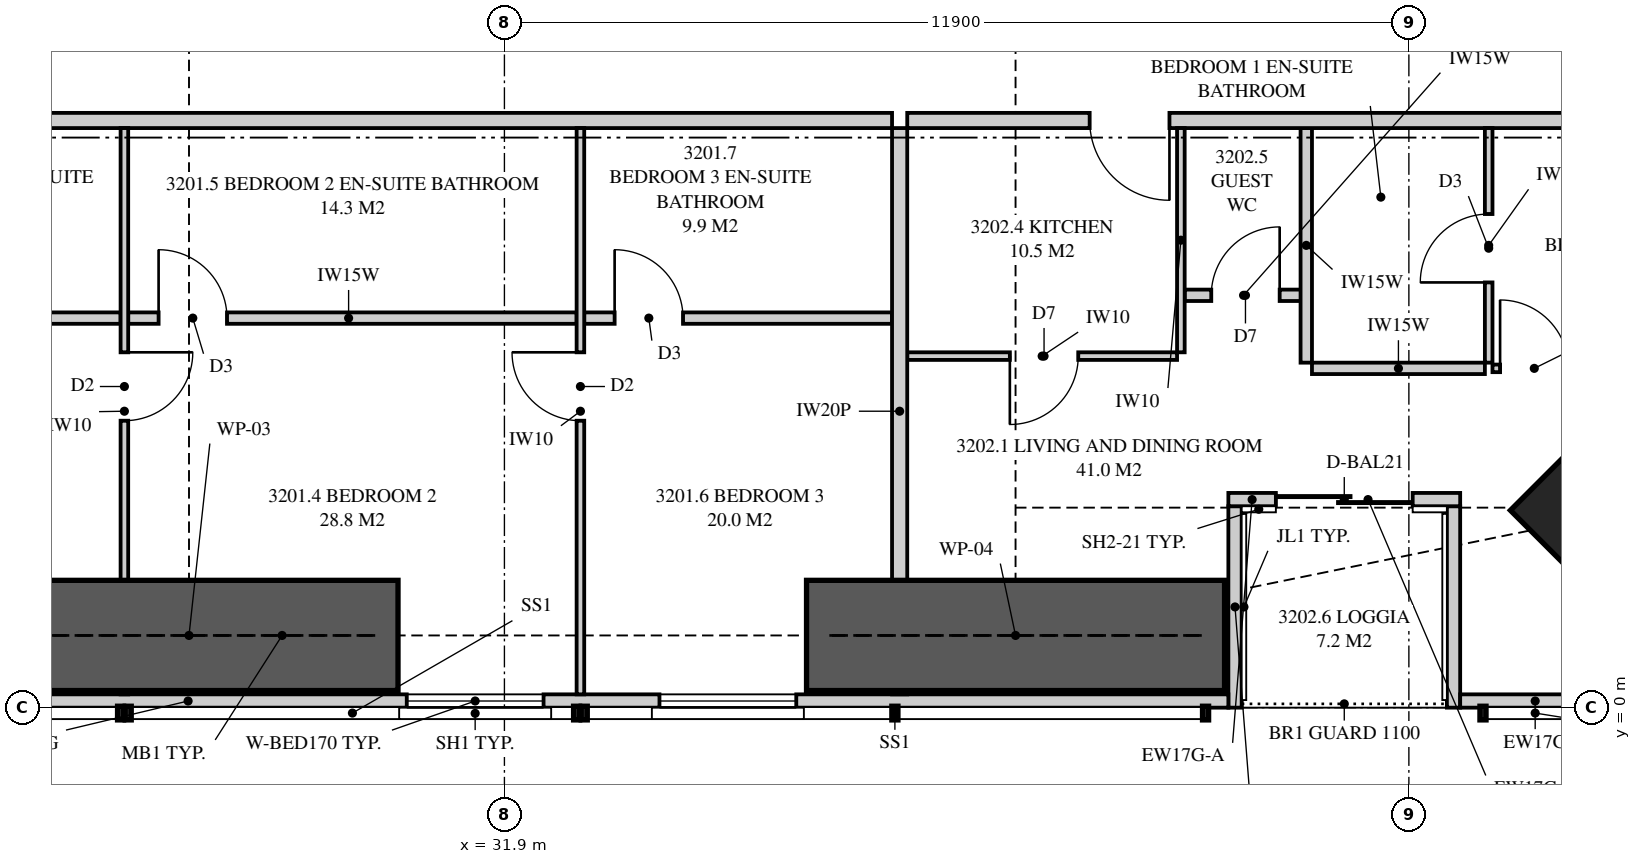
"""IFC4 building model, lengths in metres.
Left out: names, types, materials, properties, quantities, classifications, styles, units other than length and angle.
Written with IfcOpenShell. Run it as: python <this file> out.ifc"""

import sys

from ifc_helpers import new_model, si_unit, direction, frame, frame_2d, origin, origin_2d, place, context, subcontext, project, spatial, polyline, rectangle, outline, extrude, element, fill, save


model = new_model("IFC4")
c1 = context("Model", 3, precision=1e-05, world=origin(), true_north=direction((0.0, 1.0)))
c2 = subcontext(c1, "Body", "Model", "MODEL_VIEW")
j1 = project(units=[si_unit("LENGTHUNIT", "METRE"), si_unit("PLANEANGLEUNIT", "RADIAN")], contexts=[c1])
p1 = place(None, origin())
s1 = spatial("IfcSite", under=j1, at=p1, CompositionType="ELEMENT")
p2 = place(p1, origin())
s2 = spatial("IfcBuilding", under=s1, at=p2, CompositionType="ELEMENT")
p3 = place(p2, frame((0.0, 0.0, 118.25)))
s3 = spatial("IfcBuildingStorey", under=s2, at=p3, CompositionType="ELEMENT", Elevation=118.25)
p4 = place(p3, frame((46.869, 2.631, 0.0), z_axis=(0.0, 0.0, 1.0), x_axis=(-0.707106781187, 0.707106781187, 0.0)))
e1 = element("IfcColumn", 1, at=p4, inside=s3, PredefinedType="COLUMN", context=c2, shape_type="SweptSolid", body=[
    extrude(rectangle(XDim=2.4, YDim=2.5, at=origin_2d()), origin(), (0.0, 0.0, 1.0), 3.35),
])
p5 = place(p3, frame((14.051, 0.087, 0.0), z_axis=(0.0, 0.0, 1.0), x_axis=(1.0, 0.0, 0.0)))
e2 = element("IfcWall", 2, at=p5, inside=s3, PredefinedType="SOLIDWALL", context=c2, shape_type="SweptSolid", body=[
    extrude(outline(polyline([(0.0, 0.0), (27.374, 0.0), (27.374, 3.11), (24.777, 3.11), (24.777, 2.15), (24.732, 2.15), (24.732, 3.11), (24.574, 3.11), (24.574, 2.15), (2.824, 2.15), (2.824, 3.11), (2.666, 3.11), (2.666, 2.15), (2.62, 2.15), (2.62, 3.11), (0.0, 3.11), (0.0, 0.0)])), frame((0.0, 0.087, 0.0), z_axis=(0.0, -1.0, 0.0), x_axis=(1.0, 0.0, 0.0)), (0.0, 0.0, 1.0), 0.175),
])
p6 = place(p5, frame((5.874, 0.0, 0.4)))
e3 = element("IfcOpeningElement", 3, at=p6, cuts=e2, PredefinedType="OPENING", context=c2, shape_type="SweptSolid", body=[
    extrude(rectangle(XDim=1.8, YDim=1.7, at=frame_2d((0.9, 0.85))), frame((0.0, 0.097, 0.0), z_axis=(0.0, -1.0, 0.0), x_axis=(1.0, 0.0, 0.0)), (0.0, 0.0, 1.0), 0.195),
])
p7 = place(p5, frame((9.04, 0.0, 0.4)))
e4 = element("IfcOpeningElement", 4, at=p7, cuts=e2, PredefinedType="OPENING", context=c2, shape_type="SweptSolid", body=[
    extrude(rectangle(XDim=1.8, YDim=1.7, at=frame_2d((0.9, 0.85))), frame((0.0, 0.097, 0.0), z_axis=(0.0, -1.0, 0.0), x_axis=(1.0, 0.0, 0.0)), (0.0, 0.0, 1.0), 0.195),
])
p8 = place(p5, frame((16.564, 0.0, 0.4)))
e5 = element("IfcOpeningElement", 5, at=p8, cuts=e2, PredefinedType="OPENING", context=c2, shape_type="SweptSolid", body=[
    extrude(rectangle(XDim=1.8, YDim=1.7, at=frame_2d((0.9, 0.85))), frame((0.0, 0.097, 0.0), z_axis=(0.0, -1.0, 0.0), x_axis=(1.0, 0.0, 0.0)), (0.0, 0.0, 1.0), 0.195),
])
p9 = place(p5, frame((19.889, 0.0, 0.4)))
e6 = element("IfcOpeningElement", 6, at=p9, cuts=e2, PredefinedType="OPENING", context=c2, shape_type="SweptSolid", body=[
    extrude(rectangle(XDim=1.8, YDim=1.7, at=frame_2d((0.9, 0.85))), frame((0.0, 0.097, 0.0), z_axis=(0.0, -1.0, 0.0), x_axis=(1.0, 0.0, 0.0)), (0.0, 0.0, 1.0), 0.195),
])
p10 = place(p3, frame((44.475, 0.087, 0.0), z_axis=(0.0, 0.0, 1.0), x_axis=(1.0, 0.0, 0.0)))
e7 = element("IfcWall", 7, at=p10, inside=s3, PredefinedType="SOLIDWALL", context=c2, shape_type="SweptSolid", body=[
    extrude(rectangle(XDim=1.974, YDim=0.175, at=frame_2d((0.987, 0.0))), origin(), (0.0, 0.0, 1.0), 3.11),
])
p11 = place(p3, frame((41.425, 2.738, 0.0), z_axis=(0.0, 0.0, 1.0), x_axis=(1.0, 0.0, 0.0)))
e8 = element("IfcWall", 8, at=p11, inside=s3, PredefinedType="SOLIDWALL", context=c2, shape_type="SweptSolid", body=[
    extrude(rectangle(XDim=0.625, YDim=0.175, at=frame_2d((0.312, 0.0))), origin(), (0.0, 0.0, 1.0), 2.51),
])
p12 = place(p3, frame((42.05, 2.738, 0.0), z_axis=(0.0, 0.0, 1.0), x_axis=(1.0, 0.0, 0.0)))
e9 = element("IfcWall", 9, at=p12, inside=s3, PredefinedType="SOLIDWALL", context=c2, shape_type="SweptSolid", body=[
    extrude(rectangle(XDim=2.425, YDim=0.175, at=frame_2d((1.212, 0.0))), origin(), (0.0, 0.0, 1.0), 2.15),
])
p13 = place(p12, origin())
e10 = element("IfcOpeningElement", 10, at=p13, cuts=e9, PredefinedType="OPENING", context=c2, shape_type="SweptSolid", body=[
    extrude(rectangle(XDim=1.8, YDim=2.1, at=frame_2d((0.9, 1.05))), frame((0.0, 0.097, 0.0), z_axis=(0.0, -1.0, 0.0), x_axis=(1.0, 0.0, 0.0)), (0.0, 0.0, 1.0), 0.195),
])
p14 = place(p3, frame((41.512, 0.0, 0.0), z_axis=(0.0, 0.0, 1.0), x_axis=(0.0, 1.0, 0.0)))
e11 = element("IfcWall", 11, at=p14, inside=s3, PredefinedType="SOLIDWALL", context=c2, shape_type="SweptSolid", body=[
    extrude(outline(polyline([(0.0, 0.0), (2.65, 0.0), (2.65, 2.51), (2.373, 2.51), (2.373, 2.15), (0.705, 2.15), (0.705, 3.11), (0.0, 3.11), (0.0, 0.0)])), frame((0.0, 0.087, 0.0), z_axis=(0.0, -1.0, 0.0), x_axis=(1.0, 0.0, 0.0)), (0.0, 0.0, 1.0), 0.175),
])
p15 = place(p3, frame((44.387, 0.0, 0.0), z_axis=(0.0, 0.0, 1.0), x_axis=(0.0, 1.0, 0.0)))
e12 = element("IfcWall", 12, at=p15, inside=s3, PredefinedType="SOLIDWALL", context=c2, shape_type="SweptSolid", body=[
    extrude(outline(polyline([(0.0, 0.0), (2.65, 0.0), (2.65, 2.15), (1.291, 2.15), (1.291, 3.11), (0.0, 3.11), (0.0, 0.0)])), frame((0.0, 0.087, 0.0), z_axis=(0.0, -1.0, 0.0), x_axis=(1.0, 0.0, 0.0)), (0.0, 0.0, 1.0), 0.175),
])
p16 = place(p3, frame((37.1, 0.175, 0.0), z_axis=(0.0, 0.0, 1.0), x_axis=(0.0, 1.0, 0.0)))
e13 = element("IfcWall", 13, at=p16, inside=s3, PredefinedType="PARTITIONING", context=c2, shape_type="SweptSolid", body=[
    extrude(outline(polyline([(0.529, 2.15), (0.0, 2.15), (0.0, 0.0), (0.529, 0.0), (0.529, 0.461), (1.021, 0.461), (1.021, 0.0), (7.45, 0.0), (7.45, 3.11), (1.685, 3.11), (1.685, 2.15), (1.021, 2.15), (1.021, 1.688), (0.529, 1.688), (0.529, 2.15)])), frame((0.0, 0.1, 0.0), z_axis=(0.0, -1.0, 0.0), x_axis=(1.0, 0.0, 0.0)), (0.0, 0.0, 1.0), 0.2),
])
p17 = place(p3, frame((17.775, 7.725, 0.0), z_axis=(0.0, 0.0, 1.0), x_axis=(1.0, 0.0, 0.0)))
e14 = element("IfcWall", 14, at=p17, inside=s3, PredefinedType="PARTITIONING", context=c2, shape_type="SweptSolid", body=[
    extrude(outline(polyline([(0.0, 0.0), (19.225, 0.0), (19.225, 3.11), (10.312, 3.11), (10.312, 2.541), (9.638, 2.541), (9.638, 3.11), (0.0, 3.11), (0.0, 0.0)])), frame((0.0, 0.1, 0.0), z_axis=(0.0, -1.0, 0.0), x_axis=(1.0, 0.0, 0.0)), (0.0, 0.0, 1.0), 0.2),
])
p18 = place(p17, frame((3.275, 0.0, 0.0)))
e15 = element("IfcOpeningElement", 15, at=p18, cuts=e14, PredefinedType="OPENING", context=c2, shape_type="SweptSolid", body=[
    extrude(rectangle(XDim=1.05, YDim=2.2, at=frame_2d((0.525, 1.1))), frame((0.0, 0.11, 0.0), z_axis=(0.0, -1.0, 0.0), x_axis=(1.0, 0.0, 0.0)), (0.0, 0.0, 1.0), 0.22),
])
p19 = place(p3, frame((26.9, 0.175, 0.0), z_axis=(0.0, 0.0, 1.0), x_axis=(0.0, 1.0, 0.0)))
e16 = element("IfcWall", 16, at=p19, inside=s3, PredefinedType="PARTITIONING", context=c2, shape_type="SweptSolid", body=[
    extrude(outline(polyline([(0.529, 2.15), (0.0, 2.15), (0.0, 0.0), (0.529, 0.0), (0.529, 0.889), (1.021, 0.889), (1.021, 0.0), (7.45, 0.0), (7.45, 3.11), (1.635, 3.11), (1.635, 2.15), (1.021, 2.15), (1.021, 1.261), (0.529, 1.261), (0.529, 2.15)])), frame((0.0, 0.05, 0.0), z_axis=(0.0, -1.0, 0.0), x_axis=(1.0, 0.0, 0.0)), (0.0, 0.0, 1.0), 0.1),
])
p20 = place(p19, frame((3.6, 0.0, 0.0)))
e17 = element("IfcOpeningElement", 17, at=p20, cuts=e16, PredefinedType="OPENING", context=c2, shape_type="SweptSolid", body=[
    extrude(rectangle(XDim=0.9, YDim=2.1, at=frame_2d((0.45, 1.05))), frame((0.0, 0.06, 0.0), z_axis=(0.0, -1.0, 0.0), x_axis=(1.0, 0.0, 0.0)), (0.0, 0.0, 1.0), 0.12),
])
p21 = place(p3, frame((32.9, 0.175, 0.0), z_axis=(0.0, 0.0, 1.0), x_axis=(0.0, 1.0, 0.0)))
e18 = element("IfcWall", 18, at=p21, inside=s3, PredefinedType="PARTITIONING", context=c2, shape_type="SweptSolid", body=[
    extrude(outline(polyline([(0.0, 0.0), (7.45, 0.0), (7.45, 3.11), (1.635, 3.11), (1.635, 2.15), (0.0, 2.15), (0.0, 3.11), (0.0, 0.0)])), frame((0.0, 0.05, 0.0), z_axis=(0.0, -1.0, 0.0), x_axis=(1.0, 0.0, 0.0)), (0.0, 0.0, 1.0), 0.1),
])
p22 = place(p21, frame((3.6, 0.0, 0.0)))
e19 = element("IfcOpeningElement", 19, at=p22, cuts=e18, PredefinedType="OPENING", context=c2, shape_type="SweptSolid", body=[
    extrude(rectangle(XDim=0.9, YDim=2.1, at=frame_2d((0.45, 1.05))), frame((0.0, 0.06, 0.0), z_axis=(0.0, -1.0, 0.0), x_axis=(1.0, 0.0, 0.0)), (0.0, 0.0, 1.0), 0.12),
])
p23 = place(p3, frame((22.7, 5.125, 0.0), z_axis=(0.0, 0.0, 1.0), x_axis=(1.0, 0.0, 0.0)))
e20 = element("IfcWall", 20, at=p23, inside=s3, PredefinedType="PLUMBINGWALL", context=c2, shape_type="SweptSolid", body=[
    extrude(rectangle(XDim=4.15, YDim=0.15, at=frame_2d((2.075, 0.0))), origin(), (0.0, 0.0, 1.0), 3.11),
])
p24 = place(p23, frame((0.4, 0.0, 0.0)))
e21 = element("IfcOpeningElement", 21, at=p24, cuts=e20, PredefinedType="OPENING", context=c2, shape_type="SweptSolid", body=[
    extrude(rectangle(XDim=0.9, YDim=2.1, at=frame_2d((0.45, 1.05))), frame((0.0, 0.085, 0.0), z_axis=(0.0, -1.0, 0.0), x_axis=(1.0, 0.0, 0.0)), (0.0, 0.0, 1.0), 0.17),
])
p25 = place(p3, frame((26.95, 5.125, 0.0), z_axis=(0.0, 0.0, 1.0), x_axis=(1.0, 0.0, 0.0)))
e22 = element("IfcWall", 22, at=p25, inside=s3, PredefinedType="PLUMBINGWALL", context=c2, shape_type="SweptSolid", body=[
    extrude(outline(polyline([(0.0, 0.0), (5.9, 0.0), (5.9, 3.11), (1.112, 3.11), (1.112, 2.541), (0.488, 2.541), (0.488, 3.11), (0.0, 3.11), (0.0, 0.0)])), frame((0.0, 0.075, 0.0), z_axis=(0.0, -1.0, 0.0), x_axis=(1.0, 0.0, 0.0)), (0.0, 0.0, 1.0), 0.15),
])
p26 = place(p25, frame((0.4, 0.0, 0.0)))
e23 = element("IfcOpeningElement", 23, at=p26, cuts=e22, PredefinedType="OPENING", context=c2, shape_type="SweptSolid", body=[
    extrude(rectangle(XDim=0.9, YDim=2.1, at=frame_2d((0.45, 1.05))), frame((0.0, 0.085, 0.0), z_axis=(0.0, -1.0, 0.0), x_axis=(1.0, 0.0, 0.0)), (0.0, 0.0, 1.0), 0.17),
])
p27 = place(p3, frame((32.95, 5.125, 0.0), z_axis=(0.0, 0.0, 1.0), x_axis=(1.0, 0.0, 0.0)))
e24 = element("IfcWall", 24, at=p27, inside=s3, PredefinedType="PLUMBINGWALL", context=c2, shape_type="SweptSolid", body=[
    extrude(rectangle(XDim=4.05, YDim=0.15, at=frame_2d((2.025, 0.0))), origin(), (0.0, 0.0, 1.0), 3.11),
])
p28 = place(p27, frame((0.4, 0.0, 0.0)))
e25 = element("IfcOpeningElement", 25, at=p28, cuts=e24, PredefinedType="OPENING", context=c2, shape_type="SweptSolid", body=[
    extrude(rectangle(XDim=0.9, YDim=2.1, at=frame_2d((0.45, 1.05))), frame((0.0, 0.085, 0.0), z_axis=(0.0, -1.0, 0.0), x_axis=(1.0, 0.0, 0.0)), (0.0, 0.0, 1.0), 0.17),
])
p29 = place(p3, frame((37.2, 7.725, 0.0), z_axis=(0.0, 0.0, 1.0), x_axis=(1.0, 0.0, 0.0)))
e26 = element("IfcWall", 26, at=p29, inside=s3, PredefinedType="PARTITIONING", context=c2, shape_type="SweptSolid", body=[
    extrude(outline(polyline([(0.0, 0.0), (8.825, 0.0), (8.825, 3.11), (1.762, 3.11), (1.762, 2.541), (1.088, 2.541), (1.088, 3.11), (0.0, 3.11), (0.0, 0.0)])), frame((0.0, 0.1, 0.0), z_axis=(0.0, -1.0, 0.0), x_axis=(1.0, 0.0, 0.0)), (0.0, 0.0, 1.0), 0.2),
])
p30 = place(p29, frame((2.4, 0.0, 0.0)))
e27 = element("IfcOpeningElement", 27, at=p30, cuts=e26, PredefinedType="OPENING", context=c2, shape_type="SweptSolid", body=[
    extrude(rectangle(XDim=1.05, YDim=2.2, at=frame_2d((0.525, 1.1))), frame((0.0, 0.11, 0.0), z_axis=(0.0, -1.0, 0.0), x_axis=(1.0, 0.0, 0.0)), (0.0, 0.0, 1.0), 0.22),
])
p31 = place(p3, frame((44.85, 4.539, 0.0), z_axis=(0.0, 0.0, 1.0), x_axis=(0.0, 1.0, 0.0)))
e28 = element("IfcWall", 28, at=p31, inside=s3, PredefinedType="PARTITIONING", context=c2, shape_type="SweptSolid", body=[
    extrude(rectangle(XDim=3.086, YDim=0.1, at=frame_2d((1.543, 0.0))), origin(), (0.0, 0.0, 1.0), 3.11),
])
p32 = place(p31, frame((1.056, 0.0, 0.0)))
e29 = element("IfcOpeningElement", 29, at=p32, cuts=e28, PredefinedType="OPENING", context=c2, shape_type="SweptSolid", body=[
    extrude(rectangle(XDim=0.9, YDim=2.1, at=frame_2d((0.45, 1.05))), frame((0.0, 0.06, 0.0), z_axis=(0.0, -1.0, 0.0), x_axis=(1.0, 0.0, 0.0)), (0.0, 0.0, 1.0), 0.12),
])
p33 = place(p3, frame((44.9, 4.464, 0.0), z_axis=(0.0, 0.0, 1.0), x_axis=(1.0, 0.0, 0.0)))
e30 = element("IfcWall", 30, at=p33, inside=s3, PredefinedType="PARTITIONING", context=c2, shape_type="SweptSolid", body=[
    extrude(outline(polyline([(0.0, 0.0), (4.6, 0.0), (4.6, 3.11), (3.137, 3.11), (3.137, 2.15), (1.395, 2.15), (1.395, 3.11), (0.0, 3.11), (0.0, 0.0)])), frame((0.0, 0.05, 0.0), z_axis=(0.0, -1.0, 0.0), x_axis=(1.0, 0.0, 0.0)), (0.0, 0.0, 1.0), 0.1),
])
p34 = place(p33, frame((0.1, 0.0, 0.0)))
e31 = element("IfcOpeningElement", 31, at=p34, cuts=e30, PredefinedType="OPENING", context=c2, shape_type="SweptSolid", body=[
    extrude(rectangle(XDim=0.9, YDim=2.1, at=frame_2d((0.45, 1.05))), frame((0.0, 0.06, 0.0), z_axis=(0.0, -1.0, 0.0), x_axis=(1.0, 0.0, 0.0)), (0.0, 0.0, 1.0), 0.12),
])
p35 = place(p3, frame((42.525, 4.464, 0.0), z_axis=(0.0, 0.0, 1.0), x_axis=(1.0, 0.0, 0.0)))
e32 = element("IfcWall", 32, at=p35, inside=s3, PredefinedType="PLUMBINGWALL", context=c2, shape_type="SweptSolid", body=[
    extrude(rectangle(XDim=2.275, YDim=0.15, at=frame_2d((1.138, 0.0))), origin(), (0.0, 0.0, 1.0), 3.11),
])
p36 = place(p3, frame((42.45, 4.539, 0.0), z_axis=(0.0, 0.0, 1.0), x_axis=(0.0, 1.0, 0.0)))
e33 = element("IfcWall", 33, at=p36, inside=s3, PredefinedType="PLUMBINGWALL", context=c2, shape_type="SweptSolid", body=[
    extrude(rectangle(XDim=3.086, YDim=0.15, at=frame_2d((1.543, 0.0))), origin(), (0.0, 0.0, 1.0), 3.11),
])
p37 = place(p3, frame((37.2, 4.625, 0.0), z_axis=(0.0, 0.0, 1.0), x_axis=(1.0, 0.0, 0.0)))
e34 = element("IfcWall", 34, at=p37, inside=s3, PredefinedType="PARTITIONING", context=c2, shape_type="SweptSolid", body=[
    extrude(outline(polyline([(0.0, 0.0), (3.55, 0.0), (3.55, 3.11), (1.712, 3.11), (1.712, 2.541), (1.138, 2.541), (1.138, 3.11), (0.0, 3.11), (0.0, 0.0)])), frame((0.0, 0.05, 0.0), z_axis=(0.0, -1.0, 0.0), x_axis=(1.0, 0.0, 0.0)), (0.0, 0.0, 1.0), 0.1),
])
p38 = place(p37, frame((1.35, 0.0, 0.0)))
e35 = element("IfcOpeningElement", 35, at=p38, cuts=e34, PredefinedType="OPENING", context=c2, shape_type="SweptSolid", body=[
    extrude(rectangle(XDim=0.9, YDim=2.1, at=frame_2d((0.45, 1.05))), frame((0.0, 0.06, 0.0), z_axis=(0.0, -1.0, 0.0), x_axis=(1.0, 0.0, 0.0)), (0.0, 0.0, 1.0), 0.12),
])
p39 = place(p3, frame((40.8, 4.675, 0.0), z_axis=(0.0, 0.0, 1.0), x_axis=(0.0, 1.0, 0.0)))
e36 = element("IfcWall", 36, at=p39, inside=s3, PredefinedType="PARTITIONING", context=c2, shape_type="SweptSolid", body=[
    extrude(rectangle(XDim=2.95, YDim=0.1, at=frame_2d((1.475, 0.0))), origin(), (0.0, 0.0, 1.0), 3.11),
])
p40 = place(p3, frame((40.85, 5.425, 0.0), z_axis=(0.0, 0.0, 1.0), x_axis=(1.0, 0.0, 0.0)))
e37 = element("IfcWall", 37, at=p40, inside=s3, PredefinedType="PLUMBINGWALL", context=c2, shape_type="SweptSolid", body=[
    extrude(rectangle(XDim=1.55, YDim=0.15, at=frame_2d((0.775, 0.0))), origin(), (0.0, 0.0, 1.0), 3.11),
])
p41 = place(p40, frame((0.35, 0.0, 0.0)))
e38 = element("IfcOpeningElement", 38, at=p41, cuts=e37, PredefinedType="OPENING", context=c2, shape_type="SweptSolid", body=[
    extrude(rectangle(XDim=0.9, YDim=2.1, at=frame_2d((0.45, 1.05))), frame((0.0, 0.085, 0.0), z_axis=(0.0, -1.0, 0.0), x_axis=(1.0, 0.0, 0.0)), (0.0, 0.0, 1.0), 0.17),
])
for number, where, z_axis, x_axis in (
    (39, (25.0, 0.95, 0.0), (0.0, 0.0, 1.0), (1.0, 0.0, 0.0)),
    (40, (35.875, 0.95, 0.0), (0.0, 0.0, 1.0), (1.0, 0.0, 0.0)),
):
    element("IfcWall", number, at=place(p3, frame(where, z_axis=z_axis, x_axis=x_axis)), inside=s3, PredefinedType="SHEAR", context=c2, shape_type="SweptSolid", body=[
        extrude(rectangle(XDim=5.5, YDim=1.45, at=frame_2d((2.75, 0.0))), origin(), (0.0, 0.0, 1.0), 3.35),
    ])
p42 = place(p8, origin())
e41 = element("IfcWindow", 41, at=p42, inside=s3, PartitioningType="SINGLE_PANEL", PredefinedType="WINDOW", context=c2, shape_type="SweptSolid", body=[
    extrude(rectangle(XDim=1.8, YDim=1.7, at=frame_2d((0.9, 0.85))), frame((0.0, 0.03, 0.0), z_axis=(0.0, -1.0, 0.0), x_axis=(1.0, 0.0, 0.0)), (0.0, 0.0, 1.0), 0.06),
])
fill(e5, e41)
p43 = place(p9, origin())
e42 = element("IfcWindow", 42, at=p43, inside=s3, PartitioningType="SINGLE_PANEL", PredefinedType="WINDOW", context=c2, shape_type="SweptSolid", body=[
    extrude(rectangle(XDim=1.8, YDim=1.7, at=frame_2d((0.9, 0.85))), frame((0.0, 0.03, 0.0), z_axis=(0.0, -1.0, 0.0), x_axis=(1.0, 0.0, 0.0)), (0.0, 0.0, 1.0), 0.06),
])
fill(e6, e42)
p44 = place(p13, origin())
e43 = element("IfcDoor", 43, at=p44, inside=s3, OperationType="SLIDING_TO_LEFT", PredefinedType="DOOR", context=c2, shape_type="SweptSolid", body=[
    extrude(rectangle(XDim=1.8, YDim=2.1, at=frame_2d((0.9, 1.05))), frame((0.0, 0.025, 0.0), z_axis=(0.0, -1.0, 0.0), x_axis=(1.0, 0.0, 0.0)), (0.0, 0.0, 1.0), 0.05),
])
fill(e10, e43)
p45 = place(p20, frame((0.9, 0.0, 0.0), z_axis=(0.0, 0.0, 1.0), x_axis=(-1.0, 0.0, 0.0)))
e44 = element("IfcDoor", 44, at=p45, inside=s3, OperationType="SINGLE_SWING_LEFT", PredefinedType="DOOR", context=c2, shape_type="SweptSolid", body=[
    extrude(rectangle(XDim=0.9, YDim=2.1, at=frame_2d((0.45, 1.05))), frame((0.0, 0.025, 0.0), z_axis=(0.0, -1.0, 0.0), x_axis=(1.0, 0.0, 0.0)), (0.0, 0.0, 1.0), 0.05),
])
fill(e17, e44)
p46 = place(p26, origin())
e45 = element("IfcDoor", 45, at=p46, inside=s3, OperationType="SINGLE_SWING_LEFT", PredefinedType="DOOR", context=c2, shape_type="SweptSolid", body=[
    extrude(rectangle(XDim=0.9, YDim=2.1, at=frame_2d((0.45, 1.05))), frame((0.0, 0.025, 0.0), z_axis=(0.0, -1.0, 0.0), x_axis=(1.0, 0.0, 0.0)), (0.0, 0.0, 1.0), 0.05),
])
fill(e23, e45)
p47 = place(p22, origin())
e46 = element("IfcDoor", 46, at=p47, inside=s3, OperationType="SINGLE_SWING_RIGHT", PredefinedType="DOOR", context=c2, shape_type="SweptSolid", body=[
    extrude(rectangle(XDim=0.9, YDim=2.1, at=frame_2d((0.45, 1.05))), frame((0.0, 0.025, 0.0), z_axis=(0.0, -1.0, 0.0), x_axis=(1.0, 0.0, 0.0)), (0.0, 0.0, 1.0), 0.05),
])
fill(e19, e46)
p48 = place(p28, origin())
e47 = element("IfcDoor", 47, at=p48, inside=s3, OperationType="SINGLE_SWING_LEFT", PredefinedType="DOOR", context=c2, shape_type="SweptSolid", body=[
    extrude(rectangle(XDim=0.9, YDim=2.1, at=frame_2d((0.45, 1.05))), frame((0.0, 0.025, 0.0), z_axis=(0.0, -1.0, 0.0), x_axis=(1.0, 0.0, 0.0)), (0.0, 0.0, 1.0), 0.05),
])
fill(e25, e47)
p49 = place(p30, frame((1.05, 0.0, 0.0), z_axis=(0.0, 0.0, 1.0), x_axis=(-1.0, 0.0, 0.0)))
e48 = element("IfcDoor", 48, at=p49, inside=s3, OperationType="SINGLE_SWING_LEFT", PredefinedType="DOOR", context=c2, shape_type="SweptSolid", body=[
    extrude(rectangle(XDim=1.05, YDim=2.2, at=frame_2d((0.525, 1.1))), frame((0.0, 0.025, 0.0), z_axis=(0.0, -1.0, 0.0), x_axis=(1.0, 0.0, 0.0)), (0.0, 0.0, 1.0), 0.05),
])
fill(e27, e48)
p50 = place(p34, origin())
e49 = element("IfcDoor", 49, at=p50, inside=s3, OperationType="SINGLE_SWING_LEFT", PredefinedType="DOOR", context=c2, shape_type="SweptSolid", body=[
    extrude(rectangle(XDim=0.9, YDim=2.1, at=frame_2d((0.45, 1.05))), frame((0.0, 0.025, 0.0), z_axis=(0.0, -1.0, 0.0), x_axis=(1.0, 0.0, 0.0)), (0.0, 0.0, 1.0), 0.05),
])
fill(e31, e49)
p51 = place(p32, origin())
e50 = element("IfcDoor", 50, at=p51, inside=s3, OperationType="SINGLE_SWING_LEFT", PredefinedType="DOOR", context=c2, shape_type="SweptSolid", body=[
    extrude(rectangle(XDim=0.9, YDim=2.1, at=frame_2d((0.45, 1.05))), frame((0.0, 0.025, 0.0), z_axis=(0.0, -1.0, 0.0), x_axis=(1.0, 0.0, 0.0)), (0.0, 0.0, 1.0), 0.05),
])
fill(e29, e50)
p52 = place(p38, frame((0.9, 0.0, 0.0), z_axis=(0.0, 0.0, 1.0), x_axis=(-1.0, 0.0, 0.0)))
e51 = element("IfcDoor", 51, at=p52, inside=s3, OperationType="SINGLE_SWING_RIGHT", PredefinedType="DOOR", context=c2, shape_type="SweptSolid", body=[
    extrude(rectangle(XDim=0.9, YDim=2.1, at=frame_2d((0.45, 1.05))), frame((0.0, 0.025, 0.0), z_axis=(0.0, -1.0, 0.0), x_axis=(1.0, 0.0, 0.0)), (0.0, 0.0, 1.0), 0.05),
])
fill(e35, e51)
p53 = place(p41, origin())
e52 = element("IfcDoor", 52, at=p53, inside=s3, OperationType="SINGLE_SWING_RIGHT", PredefinedType="DOOR", context=c2, shape_type="SweptSolid", body=[
    extrude(rectangle(XDim=0.9, YDim=2.1, at=frame_2d((0.45, 1.05))), frame((0.0, 0.025, 0.0), z_axis=(0.0, -1.0, 0.0), x_axis=(1.0, 0.0, 0.0)), (0.0, 0.0, 1.0), 0.05),
])
fill(e38, e52)
save(model, sys.argv[1])
